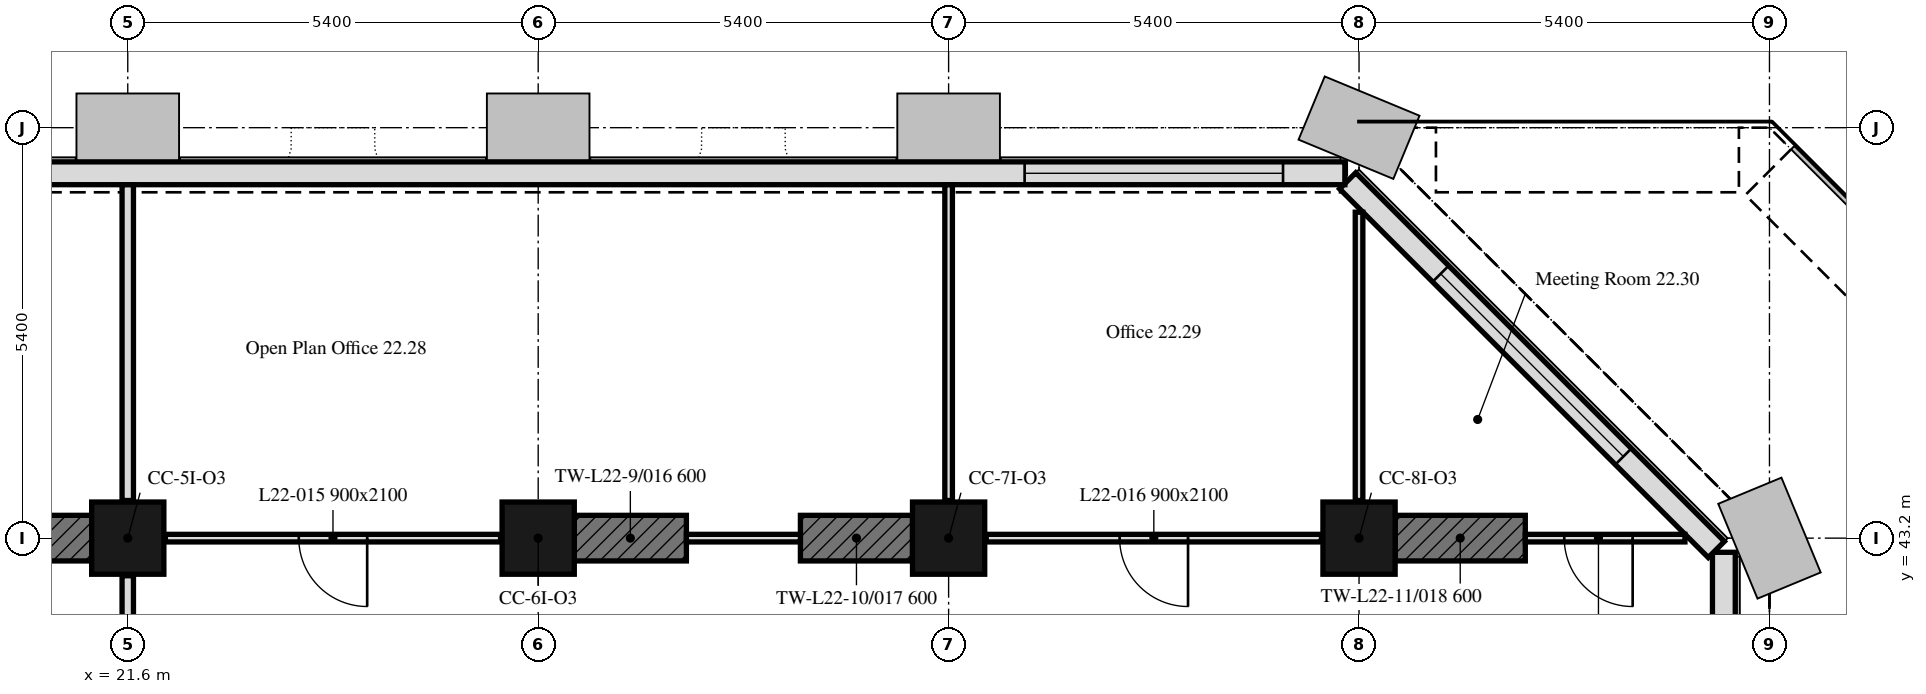
"""IFC4 building model, lengths in metres.
Left out: names, types, materials, properties, quantities, classifications, styles, units other than length and angle.
Written with IfcOpenShell. Run it as: python <this file> out.ifc"""

import sys

from ifc_helpers import new_model, si_unit, direction, frame, frame_2d, origin, origin_2d, place, context, subcontext, project, spatial, rectangle, extrude, element, fill, save


model = new_model("IFC4")
c1 = context("Model", 3, precision=1e-05, world=origin(), true_north=direction((0.0, 1.0)))
c2 = subcontext(c1, "Body", "Model", "MODEL_VIEW")
j1 = project(units=[si_unit("LENGTHUNIT", "METRE"), si_unit("PLANEANGLEUNIT", "RADIAN")], contexts=[c1])
p1 = place(None, origin())
s1 = spatial("IfcSite", under=j1, at=p1, CompositionType="ELEMENT")
p2 = place(p1, origin())
s2 = spatial("IfcBuilding", under=s1, at=p2, CompositionType="ELEMENT")
p3 = place(p2, frame((0.0, 0.0, 95.4)))
s3 = spatial("IfcBuildingStorey", under=s2, at=p3, CompositionType="ELEMENT", Elevation=95.4)
for number, where, z_axis, x_axis in (
    (1, (21.6, 43.2, 0.0), (0.0, 0.0, 1.0), (1.0, 0.0, 0.0)),
    (2, (27.0, 43.2, 0.0), (0.0, 0.0, 1.0), (1.0, 0.0, 0.0)),
    (3, (32.4, 43.2, 0.0), (0.0, 0.0, 1.0), (1.0, 0.0, 0.0)),
    (4, (37.8, 43.2, 0.0), (0.0, 0.0, 1.0), (1.0, 0.0, 0.0)),
):
    element("IfcColumn", number, at=place(p3, frame(where, z_axis=z_axis, x_axis=x_axis)), inside=s3, PredefinedType="COLUMN", context=c2, shape_type="SweptSolid", body=[
        extrude(rectangle(XDim=0.95, YDim=0.95, at=origin_2d()), origin(), (0.0, 0.0, 1.0), 3.5),
    ])
p4 = place(p3, frame((19.65, 43.2, 0.0), z_axis=(0.0, 0.0, 1.0), x_axis=(1.0, 0.0, 0.0)))
e5 = element("IfcWall", 5, at=p4, inside=s3, PredefinedType="SHEAR", context=c2, shape_type="SweptSolid", body=[
    extrude(rectangle(XDim=1.475, YDim=0.6, at=frame_2d((0.738, 0.0))), origin(), (0.0, 0.0, 1.0), 3.5),
])
p5 = place(p3, frame((27.475, 43.2, 0.0), z_axis=(0.0, 0.0, 1.0), x_axis=(1.0, 0.0, 0.0)))
e6 = element("IfcWall", 6, at=p5, inside=s3, PredefinedType="SHEAR", context=c2, shape_type="SweptSolid", body=[
    extrude(rectangle(XDim=1.475, YDim=0.6, at=frame_2d((0.737, 0.0))), origin(), (0.0, 0.0, 1.0), 3.5),
])
p6 = place(p3, frame((30.45, 43.2, 0.0), z_axis=(0.0, 0.0, 1.0), x_axis=(1.0, 0.0, 0.0)))
e7 = element("IfcWall", 7, at=p6, inside=s3, PredefinedType="SHEAR", context=c2, shape_type="SweptSolid", body=[
    extrude(rectangle(XDim=1.475, YDim=0.6, at=frame_2d((0.738, 0.0))), origin(), (0.0, 0.0, 1.0), 3.5),
])
p7 = place(p3, frame((38.275, 43.2, 0.0), z_axis=(0.0, 0.0, 1.0), x_axis=(1.0, 0.0, 0.0)))
e8 = element("IfcWall", 8, at=p7, inside=s3, PredefinedType="SHEAR", context=c2, shape_type="SweptSolid", body=[
    extrude(rectangle(XDim=1.713, YDim=0.6, at=frame_2d((0.856, 0.0))), origin(), (0.0, 0.0, 1.0), 3.5),
])
p8 = place(p3, frame((42.6, 32.4, 0.0), z_axis=(0.0, 0.0, 1.0), x_axis=(0.0, 1.0, 0.0)))
e9 = element("IfcWall", 9, at=p8, inside=s3, PredefinedType="SOLIDWALL", context=c2, shape_type="SweptSolid", body=[
    extrude(rectangle(XDim=10.614, YDim=0.3, at=frame_2d((5.307, 0.0))), origin(), (0.0, 0.0, 1.0), 3.5),
])
p9 = place(p8, frame((3.3, 0.0, 0.0)))
e10 = element("IfcOpeningElement", 10, at=p9, cuts=e9, PredefinedType="OPENING", context=c2, shape_type="SweptSolid", body=[
    extrude(rectangle(XDim=1.2, YDim=2.4, at=frame_2d((0.6, 1.2))), frame((0.0, 0.16, 0.0), z_axis=(0.0, -1.0, 0.0), x_axis=(1.0, 0.0, 0.0)), (0.0, 0.0, 1.0), 0.32),
])
p10 = place(p8, frame((7.2, 0.0, 0.0)))
e11 = element("IfcOpeningElement", 11, at=p10, cuts=e9, PredefinedType="OPENING", context=c2, shape_type="SweptSolid", body=[
    extrude(rectangle(XDim=1.8, YDim=2.4, at=frame_2d((0.9, 1.2))), frame((0.0, 0.16, 0.0), z_axis=(0.0, -1.0, 0.0), x_axis=(1.0, 0.0, 0.0)), (0.0, 0.0, 1.0), 0.32),
])
p11 = place(p3, frame((42.501, 43.051, 0.0), z_axis=(0.0, 0.0, 1.0), x_axis=(-0.707106781187, 0.707106781187, 0.0)))
e12 = element("IfcWall", 12, at=p11, inside=s3, PredefinedType="SOLIDWALL", context=c2, shape_type="SweptSolid", body=[
    extrude(rectangle(XDim=6.86, YDim=0.3, at=frame_2d((3.43, 0.0))), origin(), (0.0, 0.0, 1.0), 3.5),
])
p12 = place(p11, frame((1.73, 0.0, 0.9)))
e13 = element("IfcOpeningElement", 13, at=p12, cuts=e12, PredefinedType="OPENING", context=c2, shape_type="SweptSolid", body=[
    extrude(rectangle(XDim=3.4, YDim=1.7, at=frame_2d((1.7, 0.85))), frame((0.0, 0.16, 0.0), z_axis=(0.0, -1.0, 0.0), x_axis=(1.0, 0.0, 0.0)), (0.0, 0.0, 1.0), 0.32),
])
p13 = place(p3, frame((37.614, 48.0, 0.0), z_axis=(0.0, 0.0, 1.0), x_axis=(-1.0, 0.0, 0.0)))
e14 = element("IfcWall", 14, at=p13, inside=s3, PredefinedType="SOLIDWALL", context=c2, shape_type="SweptSolid", body=[
    extrude(rectangle(XDim=32.027, YDim=0.3, at=frame_2d((16.014, 0.0))), origin(), (0.0, 0.0, 1.0), 3.5),
])
p14 = place(p13, frame((0.814, 0.0, 0.9)))
e15 = element("IfcOpeningElement", 15, at=p14, cuts=e14, PredefinedType="OPENING", context=c2, shape_type="SweptSolid", body=[
    extrude(rectangle(XDim=3.4, YDim=1.7, at=frame_2d((1.7, 0.85))), frame((0.0, 0.16, 0.0), z_axis=(0.0, -1.0, 0.0), x_axis=(1.0, 0.0, 0.0)), (0.0, 0.0, 1.0), 0.32),
])
p15 = place(p3, frame((21.6, 38.295, 0.0), z_axis=(0.0, 0.0, 1.0), x_axis=(0.0, 1.0, 0.0)))
e16 = element("IfcWall", 16, at=p15, inside=s3, PredefinedType="PARTITIONING", context=c2, shape_type="SweptSolid", body=[
    extrude(rectangle(XDim=4.41, YDim=0.15, at=frame_2d((2.205, 0.0))), origin(), (0.0, 0.0, 1.0), 2.75),
])
p16 = place(p3, frame((21.6, 47.849, 0.0), z_axis=(0.0, 0.0, 1.0), x_axis=(0.0, -1.0, 0.0)))
e17 = element("IfcWall", 17, at=p16, inside=s3, PredefinedType="PARTITIONING", context=c2, shape_type="SweptSolid", body=[
    extrude(rectangle(XDim=4.154, YDim=0.15, at=frame_2d((2.077, 0.0))), origin(), (0.0, 0.0, 1.0), 2.75),
])
p17 = place(p3, frame((42.088, 43.2, 0.0), z_axis=(0.0, 0.0, 1.0), x_axis=(-1.0, 0.0, 0.0)))
e18 = element("IfcWall", 18, at=p17, inside=s3, PredefinedType="PARTITIONING", context=c2, shape_type="SweptSolid", body=[
    extrude(rectangle(XDim=2.1, YDim=0.1, at=frame_2d((1.05, 0.0))), origin(), (0.0, 0.0, 1.0), 3.5),
])
p18 = place(p17, frame((0.688, 0.0, 0.0)))
e19 = element("IfcOpeningElement", 19, at=p18, cuts=e18, PredefinedType="OPENING", context=c2, shape_type="SweptSolid", body=[
    extrude(rectangle(XDim=0.9, YDim=2.1, at=frame_2d((0.45, 1.05))), frame((0.0, 0.05, 0.0), z_axis=(0.0, -1.0, 0.0), x_axis=(1.0, 0.0, 0.0)), (0.0, 0.0, 1.0), 0.1),
])
p19 = place(p3, frame((37.305, 43.2, 0.0), z_axis=(0.0, 0.0, 1.0), x_axis=(-1.0, 0.0, 0.0)))
e20 = element("IfcWall", 20, at=p19, inside=s3, PredefinedType="PARTITIONING", context=c2, shape_type="SweptSolid", body=[
    extrude(rectangle(XDim=4.41, YDim=0.1, at=frame_2d((2.205, 0.0))), origin(), (0.0, 0.0, 1.0), 3.5),
])
p20 = place(p19, frame((1.755, 0.0, 0.0)))
e21 = element("IfcOpeningElement", 21, at=p20, cuts=e20, PredefinedType="OPENING", context=c2, shape_type="SweptSolid", body=[
    extrude(rectangle(XDim=0.9, YDim=2.1, at=frame_2d((0.45, 1.05))), frame((0.0, 0.05, 0.0), z_axis=(0.0, -1.0, 0.0), x_axis=(1.0, 0.0, 0.0)), (0.0, 0.0, 1.0), 0.1),
])
p21 = place(p3, frame((30.45, 43.2, 0.0), z_axis=(0.0, 0.0, 1.0), x_axis=(-1.0, 0.0, 0.0)))
e22 = element("IfcWall", 22, at=p21, inside=s3, PredefinedType="PARTITIONING", context=c2, shape_type="SweptSolid", body=[
    extrude(rectangle(XDim=1.5, YDim=0.1, at=frame_2d((0.75, 0.0))), origin(), (0.0, 0.0, 1.0), 3.5),
])
p22 = place(p3, frame((26.505, 43.2, 0.0), z_axis=(0.0, 0.0, 1.0), x_axis=(-1.0, 0.0, 0.0)))
e23 = element("IfcWall", 23, at=p22, inside=s3, PredefinedType="PARTITIONING", context=c2, shape_type="SweptSolid", body=[
    extrude(rectangle(XDim=4.41, YDim=0.1, at=frame_2d((2.205, 0.0))), origin(), (0.0, 0.0, 1.0), 3.5),
])
p23 = place(p22, frame((1.755, 0.0, 0.0)))
e24 = element("IfcOpeningElement", 24, at=p23, cuts=e23, PredefinedType="OPENING", context=c2, shape_type="SweptSolid", body=[
    extrude(rectangle(XDim=0.9, YDim=2.1, at=frame_2d((0.45, 1.05))), frame((0.0, 0.05, 0.0), z_axis=(0.0, -1.0, 0.0), x_axis=(1.0, 0.0, 0.0)), (0.0, 0.0, 1.0), 0.1),
])
p24 = place(p3, frame((32.4, 47.849, 0.0), z_axis=(0.0, 0.0, 1.0), x_axis=(0.0, -1.0, 0.0)))
e25 = element("IfcWall", 25, at=p24, inside=s3, PredefinedType="PARTITIONING", context=c2, shape_type="SweptSolid", body=[
    extrude(rectangle(XDim=4.154, YDim=0.1, at=frame_2d((2.077, 0.0))), origin(), (0.0, 0.0, 1.0), 2.75),
])
p25 = place(p3, frame((37.8, 43.695, 0.0), z_axis=(0.0, 0.0, 1.0), x_axis=(0.0, 1.0, 0.0)))
e26 = element("IfcWall", 26, at=p25, inside=s3, PredefinedType="PARTITIONING", context=c2, shape_type="SweptSolid", body=[
    extrude(rectangle(XDim=3.793, YDim=0.1, at=frame_2d((1.896, 0.0))), origin(), (0.0, 0.0, 1.0), 3.5),
])
p26 = place(p12, origin())
e27 = element("IfcWindow", 27, at=p26, inside=s3, PartitioningType="SINGLE_PANEL", PredefinedType="WINDOW", context=c2, shape_type="SweptSolid", body=[
    extrude(rectangle(XDim=3.4, YDim=1.7, at=frame_2d((1.7, 0.85))), frame((0.0, 0.03, 0.0), z_axis=(0.0, -1.0, 0.0), x_axis=(1.0, 0.0, 0.0)), (0.0, 0.0, 1.0), 0.06),
])
fill(e13, e27)
p27 = place(p14, origin())
e28 = element("IfcWindow", 28, at=p27, inside=s3, PartitioningType="SINGLE_PANEL", PredefinedType="WINDOW", context=c2, shape_type="SweptSolid", body=[
    extrude(rectangle(XDim=3.4, YDim=1.7, at=frame_2d((1.7, 0.85))), frame((0.0, 0.03, 0.0), z_axis=(0.0, -1.0, 0.0), x_axis=(1.0, 0.0, 0.0)), (0.0, 0.0, 1.0), 0.06),
])
fill(e15, e28)
p28 = place(p23, origin())
e29 = element("IfcDoor", 29, at=p28, inside=s3, OperationType="SINGLE_SWING_LEFT", PredefinedType="DOOR", context=c2, shape_type="SweptSolid", body=[
    extrude(rectangle(XDim=0.9, YDim=2.1, at=frame_2d((0.45, 1.05))), frame((0.0, 0.025, 0.0), z_axis=(0.0, -1.0, 0.0), x_axis=(1.0, 0.0, 0.0)), (0.0, 0.0, 1.0), 0.05),
])
fill(e24, e29)
p29 = place(p20, origin())
e30 = element("IfcDoor", 30, at=p29, inside=s3, OperationType="SINGLE_SWING_LEFT", PredefinedType="DOOR", context=c2, shape_type="SweptSolid", body=[
    extrude(rectangle(XDim=0.9, YDim=2.1, at=frame_2d((0.45, 1.05))), frame((0.0, 0.025, 0.0), z_axis=(0.0, -1.0, 0.0), x_axis=(1.0, 0.0, 0.0)), (0.0, 0.0, 1.0), 0.05),
])
fill(e21, e30)
p30 = place(p18, origin())
e31 = element("IfcDoor", 31, at=p30, inside=s3, OperationType="SINGLE_SWING_LEFT", PredefinedType="DOOR", context=c2, shape_type="SweptSolid", body=[
    extrude(rectangle(XDim=0.9, YDim=2.1, at=frame_2d((0.45, 1.05))), frame((0.0, 0.025, 0.0), z_axis=(0.0, -1.0, 0.0), x_axis=(1.0, 0.0, 0.0)), (0.0, 0.0, 1.0), 0.05),
])
fill(e19, e31)
save(model, sys.argv[1])
